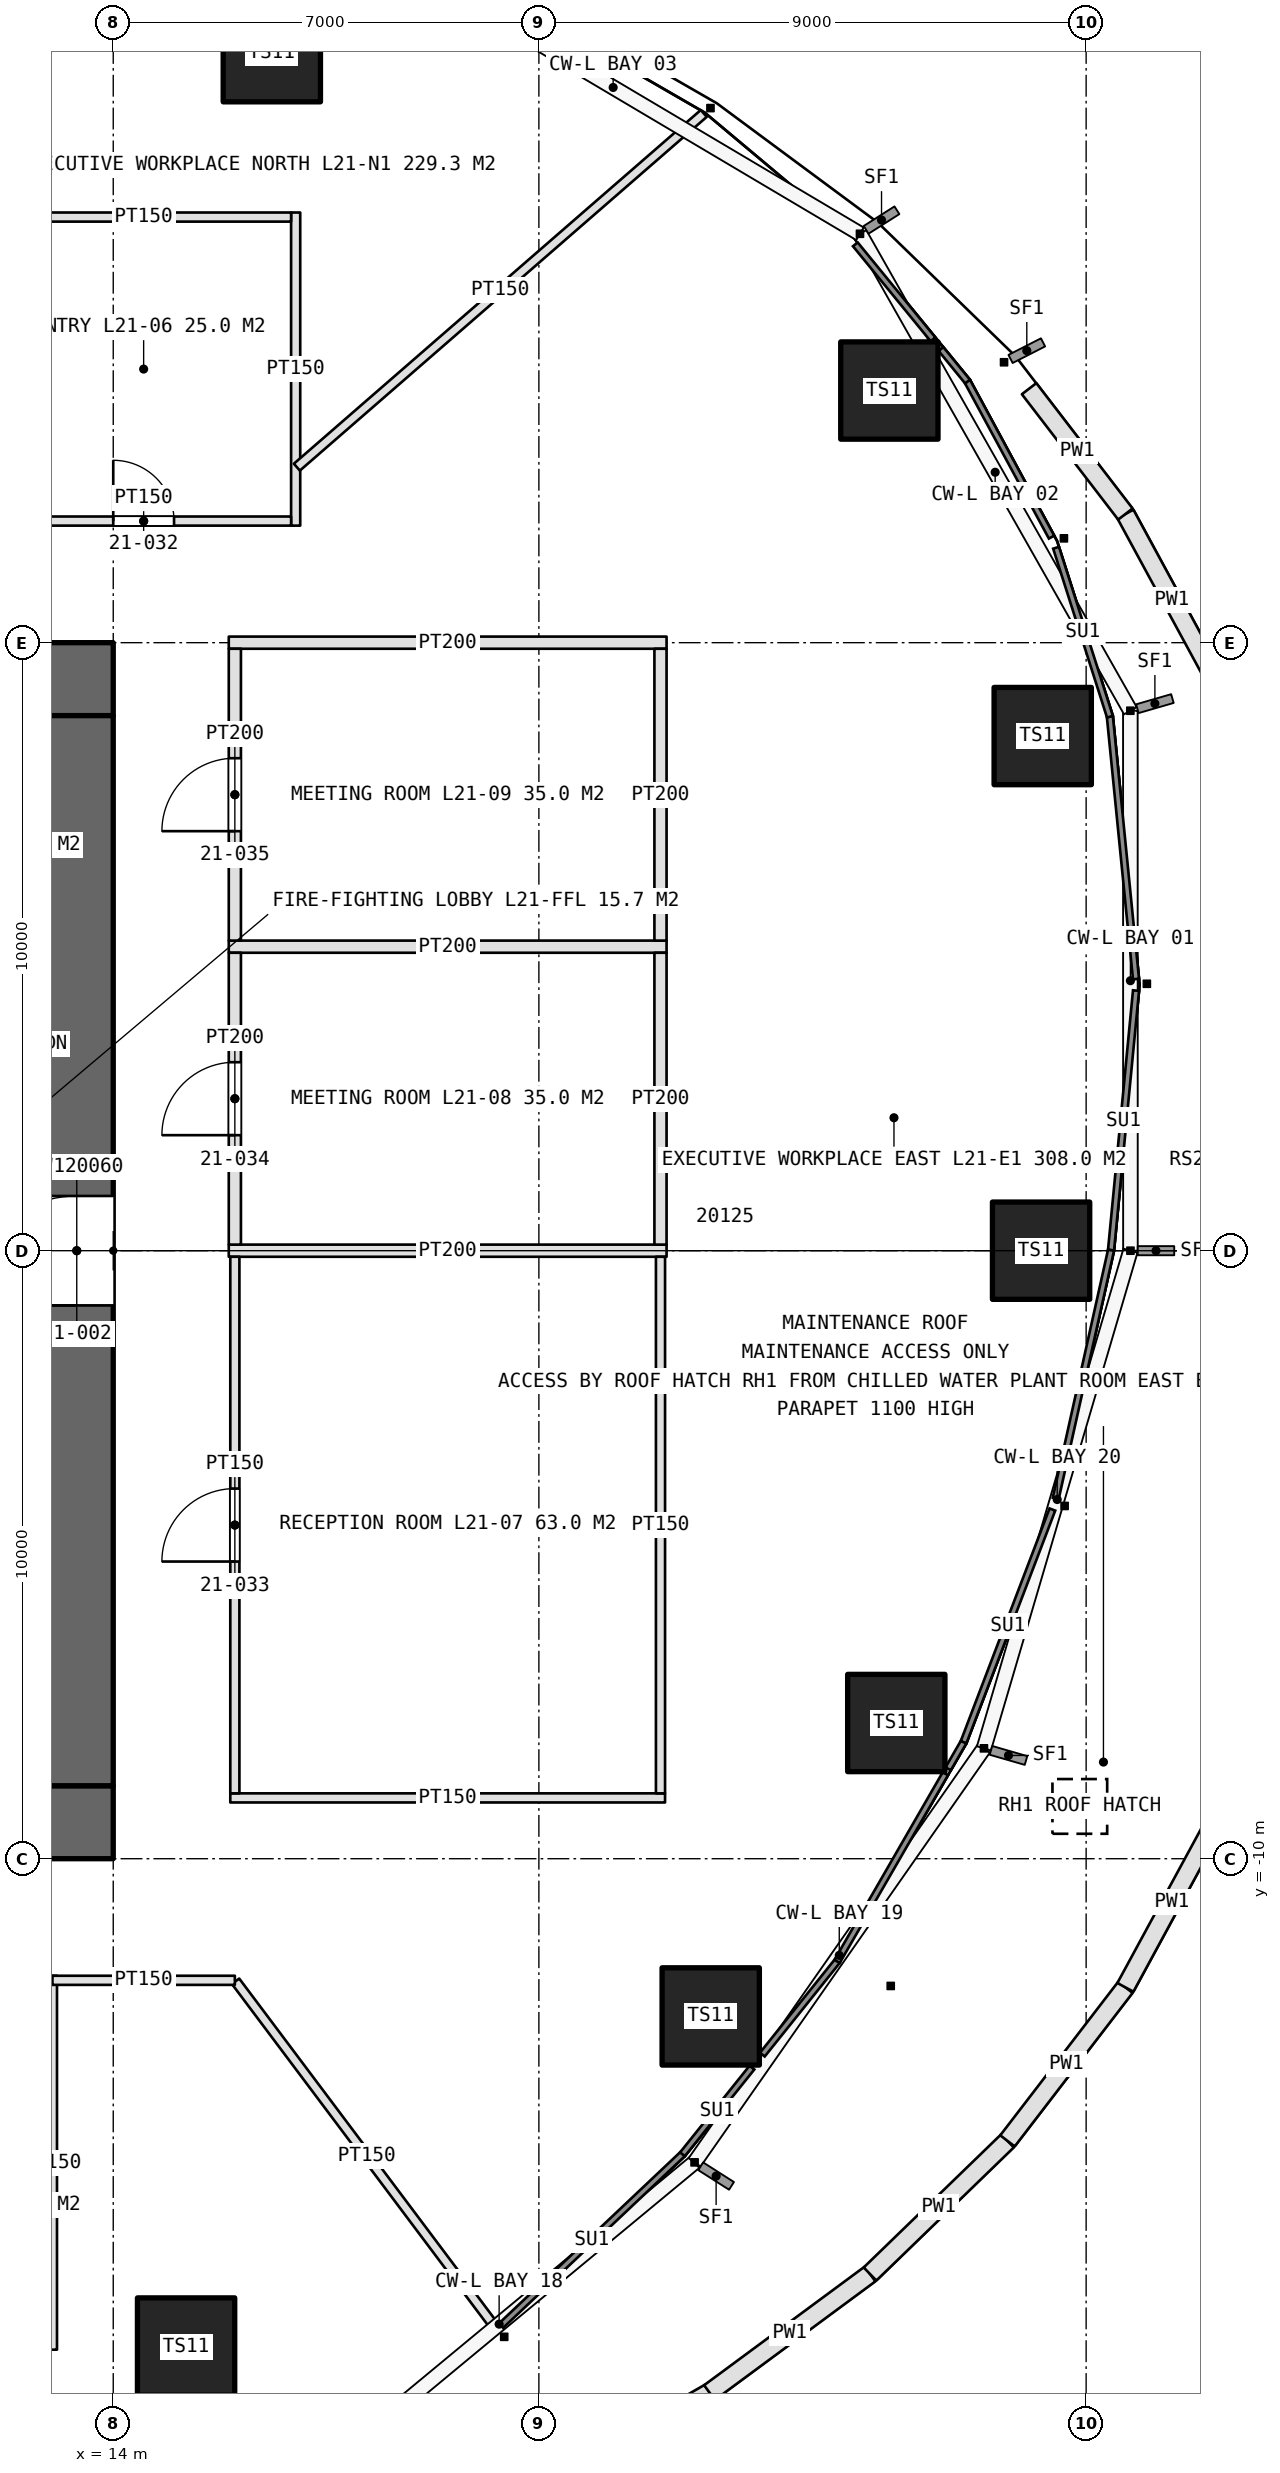
"""IFC4 building model, lengths in metres.
Left out: names, types, materials, properties, quantities, classifications, styles, units other than length and angle.
Written with IfcOpenShell. Run it as: python <this file> out.ifc"""

import sys

from ifc_helpers import new_model, si_unit, direction, frame, frame_2d, origin, origin_2d, place, context, subcontext, project, spatial, rectangle, hollow_rectangle, extrude, element, fill, save


model = new_model("IFC4")
c1 = context("Model", 3, precision=1e-05, world=origin(), true_north=direction((0.0, 1.0)))
c2 = subcontext(c1, "Body", "Model", "MODEL_VIEW")
j1 = project(units=[si_unit("LENGTHUNIT", "METRE"), si_unit("PLANEANGLEUNIT", "RADIAN")], contexts=[c1])
p1 = place(None, origin())
s1 = spatial("IfcSite", under=j1, at=p1, CompositionType="ELEMENT")
p2 = place(p1, origin())
s2 = spatial("IfcBuilding", under=s1, at=p2, CompositionType="ELEMENT")
p3 = place(p2, frame((0.0, 0.0, 105.0)))
s3 = spatial("IfcBuildingStorey", under=s2, at=p3, CompositionType="ELEMENT", Elevation=105.0)
p4 = place(p3, frame((-14.0, -9.4, 0.0), z_axis=(0.0, 0.0, 1.0), x_axis=(1.0, 0.0, 0.0)))
e1 = element("IfcWall", 1, at=p4, inside=s3, PredefinedType="SHEAR", context=c2, shape_type="SweptSolid", body=[
    extrude(rectangle(XDim=28.0, YDim=1.2, at=frame_2d((14.0, 0.0))), origin(), (0.0, 0.0, 1.0), 4.2),
])
p5 = place(p4, frame((13.1, 0.0, 0.0)))
e2 = element("IfcOpeningElement", 2, at=p5, cuts=e1, PredefinedType="OPENING", context=c2, shape_type="SweptSolid", body=[
    extrude(rectangle(XDim=1.8, YDim=2.4, at=frame_2d((0.9, 1.2))), frame((0.0, 0.61, 0.0), z_axis=(0.0, -1.0, 0.0), x_axis=(1.0, 0.0, 0.0)), (0.0, 0.0, 1.0), 1.22),
])
p6 = place(p4, frame((22.9, 0.0, 0.0)))
e3 = element("IfcOpeningElement", 3, at=p6, cuts=e1, PredefinedType="OPENING", context=c2, shape_type="SweptSolid", body=[
    extrude(rectangle(XDim=2.2, YDim=2.7, at=frame_2d((1.1, 1.35))), frame((0.0, 0.61, 0.0), z_axis=(0.0, -1.0, 0.0), x_axis=(1.0, 0.0, 0.0)), (0.0, 0.0, 1.0), 1.22),
])
p7 = place(p3, frame((14.0, 9.4, 0.0), z_axis=(0.0, 0.0, 1.0), x_axis=(-1.0, 0.0, 0.0)))
e4 = element("IfcWall", 4, at=p7, inside=s3, PredefinedType="SHEAR", context=c2, shape_type="SweptSolid", body=[
    extrude(rectangle(XDim=28.0, YDim=1.2, at=frame_2d((14.0, 0.0))), origin(), (0.0, 0.0, 1.0), 4.2),
])
p8 = place(p7, frame((24.0, 0.0, 0.0)))
e5 = element("IfcOpeningElement", 5, at=p8, cuts=e4, PredefinedType="OPENING", context=c2, shape_type="SweptSolid", body=[
    extrude(rectangle(XDim=1.0, YDim=2.4, at=frame_2d((0.5, 1.2))), frame((0.0, 0.61, 0.0), z_axis=(0.0, -1.0, 0.0), x_axis=(1.0, 0.0, 0.0)), (0.0, 0.0, 1.0), 1.22),
])
p9 = place(p7, frame((13.1, 0.0, 0.0)))
e6 = element("IfcOpeningElement", 6, at=p9, cuts=e4, PredefinedType="OPENING", context=c2, shape_type="SweptSolid", body=[
    extrude(rectangle(XDim=1.8, YDim=2.4, at=frame_2d((0.9, 1.2))), frame((0.0, 0.61, 0.0), z_axis=(0.0, -1.0, 0.0), x_axis=(1.0, 0.0, 0.0)), (0.0, 0.0, 1.0), 1.22),
])
p10 = place(p3, frame((13.4, -8.8, 0.0), z_axis=(0.0, 0.0, 1.0), x_axis=(0.0, 1.0, 0.0)))
e7 = element("IfcWall", 7, at=p10, inside=s3, PredefinedType="SHEAR", context=c2, shape_type="SweptSolid", body=[
    extrude(rectangle(XDim=17.6, YDim=1.2, at=frame_2d((8.8, 0.0))), origin(), (0.0, 0.0, 1.0), 4.2),
])
p11 = place(p10, frame((7.9, 0.0, 0.0)))
e8 = element("IfcOpeningElement", 8, at=p11, cuts=e7, PredefinedType="OPENING", context=c2, shape_type="SweptSolid", body=[
    extrude(rectangle(XDim=1.8, YDim=2.4, at=frame_2d((0.9, 1.2))), frame((0.0, 0.61, 0.0), z_axis=(0.0, -1.0, 0.0), x_axis=(1.0, 0.0, 0.0)), (0.0, 0.0, 1.0), 1.22),
])
for number, where, z_axis, x_axis in (
    (9, (29.259, 0.0, 0.975), (0.0, 0.0, 1.0), (1.0, 0.0, 0.0)),
    (10, (29.286, 8.464, 0.975), (0.0, 0.0, 1.0), (1.0, 0.0, 0.0)),
):
    element("IfcColumn", number, at=place(p3, frame(where, z_axis=z_axis, x_axis=x_axis)), inside=s3, PredefinedType="COLUMN", context=c2, shape_type="SweptSolid", body=[
        extrude(hollow_rectangle(XDim=1.6, YDim=1.6, WallThickness=0.15, at=origin_2d()), origin(), (0.0, 0.0, 1.0), 3.225),
    ])
for number, where, z_axis, x_axis in (
    (11, (26.764, 14.147, 0.0), (0.0, 0.0, 1.0), (1.0, 0.0, 0.0)),
    (12, (16.608, 19.695, 0.0), (0.0, 0.0, 1.0), (1.0, 0.0, 0.0)),
):
    element("IfcColumn", number, at=place(p3, frame(where, z_axis=z_axis, x_axis=x_axis)), inside=s3, PredefinedType="COLUMN", context=c2, shape_type="SweptSolid", body=[
        extrude(hollow_rectangle(XDim=1.6, YDim=1.6, WallThickness=0.15, at=origin_2d()), origin(), (0.0, 0.0, 1.0), 4.2),
    ])
for number, where, z_axis, x_axis in (
    (13, (15.198, -18.023, 0.975), (0.0, 0.0, 1.0), (1.0, 0.0, 0.0)),
    (14, (23.826, -12.594, 0.975), (0.0, 0.0, 1.0), (1.0, 0.0, 0.0)),
    (15, (26.878, -7.768, 0.975), (0.0, 0.0, 1.0), (1.0, 0.0, 0.0)),
):
    element("IfcColumn", number, at=place(p3, frame(where, z_axis=z_axis, x_axis=x_axis)), inside=s3, PredefinedType="COLUMN", context=c2, shape_type="SweptSolid", body=[
        extrude(hollow_rectangle(XDim=1.6, YDim=1.6, WallThickness=0.15, at=origin_2d()), origin(), (0.0, 0.0, 1.0), 3.225),
    ])
p12 = place(p3, frame((32.174, 9.299, 0.0), z_axis=(0.0, 0.0, 1.0), x_axis=(-0.476977537346, 0.878915484485, 0.0)))
e16 = element("IfcWall", 16, at=p12, inside=s3, PredefinedType="PARAPET", context=c2, shape_type="SweptSolid", body=[
    extrude(rectangle(XDim=3.205, YDim=0.3, at=frame_2d((1.602, 0.0))), origin(), (0.0, 0.0, 1.0), 1.1),
])
p13 = place(p3, frame((30.646, 12.116, 0.0), z_axis=(0.0, 0.0, 1.0), x_axis=(-0.60911150664, 0.79308459352, 0.0)))
e17 = element("IfcWall", 17, at=p13, inside=s3, PredefinedType="PARAPET", context=c2, shape_type="SweptSolid", body=[
    extrude(rectangle(XDim=2.6, YDim=0.3, at=frame_2d((1.3, 0.0))), origin(), (0.0, 0.0, 1.0), 1.1),
])
p14 = place(p3, frame((21.042, -20.365, 0.0), z_axis=(0.0, 0.0, 1.0), x_axis=(0.867530428681, 0.497384112444, 0.0)))
e18 = element("IfcWall", 18, at=p14, inside=s3, PredefinedType="PARAPET", context=c2, shape_type="SweptSolid", body=[
    extrude(rectangle(XDim=3.187, YDim=0.3, at=frame_2d((1.594, 0.0))), origin(), (0.0, 0.0, 1.0), 1.1),
])
p15 = place(p3, frame((23.806, -18.78, 0.0), z_axis=(0.0, 0.0, 1.0), x_axis=(0.804406464576, 0.594079321091, 0.0)))
e19 = element("IfcWall", 19, at=p15, inside=s3, PredefinedType="PARAPET", context=c2, shape_type="SweptSolid", body=[
    extrude(rectangle(XDim=3.281, YDim=0.3, at=frame_2d((1.641, 0.0))), origin(), (0.0, 0.0, 1.0), 1.1),
])
p16 = place(p3, frame((26.446, -16.831, 0.0), z_axis=(0.0, 0.0, 1.0), x_axis=(0.718226896914, 0.695808971306, 0.0)))
e20 = element("IfcWall", 20, at=p16, inside=s3, PredefinedType="PARAPET", context=c2, shape_type="SweptSolid", body=[
    extrude(rectangle(XDim=3.147, YDim=0.3, at=frame_2d((1.574, 0.0))), origin(), (0.0, 0.0, 1.0), 1.1),
])
p17 = place(p3, frame((28.707, -14.641, 0.0), z_axis=(0.0, 0.0, 1.0), x_axis=(0.609113922619, 0.793082737974, 0.0)))
e21 = element("IfcWall", 21, at=p17, inside=s3, PredefinedType="PARAPET", context=c2, shape_type="SweptSolid", body=[
    extrude(rectangle(XDim=3.184, YDim=0.3, at=frame_2d((1.592, 0.0))), origin(), (0.0, 0.0, 1.0), 1.1),
])
p18 = place(p3, frame((30.646, -12.116, 0.0), z_axis=(0.0, 0.0, 1.0), x_axis=(0.476977537346, 0.878915484485, 0.0)))
e22 = element("IfcWall", 22, at=p18, inside=s3, PredefinedType="PARAPET", context=c2, shape_type="SweptSolid", body=[
    extrude(rectangle(XDim=3.205, YDim=0.3, at=frame_2d((1.602, 0.0))), origin(), (0.0, 0.0, 1.0), 1.1),
])
p19 = place(p3, frame((17.0, 11.925, 0.0), z_axis=(0.0, 0.0, 1.0), x_axis=(0.0, 1.0, 0.0)))
e23 = element("IfcWall", 23, at=p19, inside=s3, PredefinedType="PARTITIONING", context=c2, shape_type="SweptSolid", body=[
    extrude(rectangle(XDim=5.15, YDim=0.15, at=frame_2d((2.575, 0.0))), origin(), (0.0, 0.0, 1.0), 3.0),
])
p20 = place(p3, frame((12.075, 12.0, 0.0), z_axis=(0.0, 0.0, 1.0), x_axis=(1.0, 0.0, 0.0)))
e24 = element("IfcWall", 24, at=p20, inside=s3, PredefinedType="PARTITIONING", context=c2, shape_type="SweptSolid", body=[
    extrude(rectangle(XDim=4.85, YDim=0.15, at=frame_2d((2.425, 0.0))), origin(), (0.0, 0.0, 1.0), 3.0),
])
p21 = place(p20, frame((1.925, 0.0, 0.0)))
e25 = element("IfcOpeningElement", 25, at=p21, cuts=e24, PredefinedType="OPENING", context=c2, shape_type="SweptSolid", body=[
    extrude(rectangle(XDim=1.0, YDim=2.2, at=frame_2d((0.5, 1.1))), frame((0.0, 0.085, 0.0), z_axis=(0.0, -1.0, 0.0), x_axis=(1.0, 0.0, 0.0)), (0.0, 0.0, 1.0), 0.17),
])
p22 = place(p3, frame((12.075, 17.0, 0.0), z_axis=(0.0, 0.0, 1.0), x_axis=(1.0, 0.0, 0.0)))
e26 = element("IfcWall", 26, at=p22, inside=s3, PredefinedType="PARTITIONING", context=c2, shape_type="SweptSolid", body=[
    extrude(rectangle(XDim=4.85, YDim=0.15, at=frame_2d((2.425, 0.0))), origin(), (0.0, 0.0, 1.0), 3.0),
])
p23 = place(p3, frame((15.925, -9.0, 0.0), z_axis=(0.0, 0.0, 1.0), x_axis=(1.0, 0.0, 0.0)))
e27 = element("IfcWall", 27, at=p23, inside=s3, PredefinedType="PARTITIONING", context=c2, shape_type="SweptSolid", body=[
    extrude(rectangle(XDim=7.15, YDim=0.15, at=frame_2d((3.575, 0.0))), origin(), (0.0, 0.0, 1.0), 3.0),
])
for number, where, z_axis, x_axis in (
    (28, (15.9, 0.0, 0.0), (0.0, 0.0, 1.0), (1.0, 0.0, 0.0)),
    (29, (15.9, 5.0, 0.0), (0.0, 0.0, 1.0), (1.0, 0.0, 0.0)),
    (30, (15.9, 10.0, 0.0), (0.0, 0.0, 1.0), (1.0, 0.0, 0.0)),
):
    element("IfcWall", number, at=place(p3, frame(where, z_axis=z_axis, x_axis=x_axis)), inside=s3, PredefinedType="PARTITIONING", context=c2, shape_type="SweptSolid", body=[
        extrude(rectangle(XDim=7.2, YDim=0.2, at=frame_2d((3.6, 0.0))), origin(), (0.0, 0.0, 1.0), 3.0),
    ])
p24 = place(p3, frame((16.0, -8.925, 0.0), z_axis=(0.0, 0.0, 1.0), x_axis=(0.0, 1.0, 0.0)))
e31 = element("IfcWall", 31, at=p24, inside=s3, PredefinedType="PARTITIONING", context=c2, shape_type="SweptSolid", body=[
    extrude(rectangle(XDim=8.825, YDim=0.15, at=frame_2d((4.413, 0.0))), origin(), (0.0, 0.0, 1.0), 3.0),
])
p25 = place(p24, frame((3.812, 0.0, 0.0)))
e32 = element("IfcOpeningElement", 32, at=p25, cuts=e31, PredefinedType="OPENING", context=c2, shape_type="SweptSolid", body=[
    extrude(rectangle(XDim=1.2, YDim=2.4, at=frame_2d((0.6, 1.2))), frame((0.0, 0.085, 0.0), z_axis=(0.0, -1.0, 0.0), x_axis=(1.0, 0.0, 0.0)), (0.0, 0.0, 1.0), 0.17),
])
p26 = place(p3, frame((23.0, -8.925, 0.0), z_axis=(0.0, 0.0, 1.0), x_axis=(0.0, 1.0, 0.0)))
e33 = element("IfcWall", 33, at=p26, inside=s3, PredefinedType="PARTITIONING", context=c2, shape_type="SweptSolid", body=[
    extrude(rectangle(XDim=8.825, YDim=0.15, at=frame_2d((4.413, 0.0))), origin(), (0.0, 0.0, 1.0), 3.0),
])
p27 = place(p3, frame((16.0, 0.1, 0.0), z_axis=(0.0, 0.0, 1.0), x_axis=(0.0, 1.0, 0.0)))
e34 = element("IfcWall", 34, at=p27, inside=s3, PredefinedType="PARTITIONING", context=c2, shape_type="SweptSolid", body=[
    extrude(rectangle(XDim=4.8, YDim=0.2, at=frame_2d((2.4, 0.0))), origin(), (0.0, 0.0, 1.0), 3.0),
])
p28 = place(p27, frame((1.8, 0.0, 0.0)))
e35 = element("IfcOpeningElement", 35, at=p28, cuts=e34, PredefinedType="OPENING", context=c2, shape_type="SweptSolid", body=[
    extrude(rectangle(XDim=1.2, YDim=2.4, at=frame_2d((0.6, 1.2))), frame((0.0, 0.11, 0.0), z_axis=(0.0, -1.0, 0.0), x_axis=(1.0, 0.0, 0.0)), (0.0, 0.0, 1.0), 0.22),
])
p29 = place(p3, frame((23.0, 0.1, 0.0), z_axis=(0.0, 0.0, 1.0), x_axis=(0.0, 1.0, 0.0)))
e36 = element("IfcWall", 36, at=p29, inside=s3, PredefinedType="PARTITIONING", context=c2, shape_type="SweptSolid", body=[
    extrude(rectangle(XDim=4.8, YDim=0.2, at=frame_2d((2.4, 0.0))), origin(), (0.0, 0.0, 1.0), 3.0),
])
p30 = place(p3, frame((16.0, 5.1, 0.0), z_axis=(0.0, 0.0, 1.0), x_axis=(0.0, 1.0, 0.0)))
e37 = element("IfcWall", 37, at=p30, inside=s3, PredefinedType="PARTITIONING", context=c2, shape_type="SweptSolid", body=[
    extrude(rectangle(XDim=4.8, YDim=0.2, at=frame_2d((2.4, 0.0))), origin(), (0.0, 0.0, 1.0), 3.0),
])
p31 = place(p30, frame((1.8, 0.0, 0.0)))
e38 = element("IfcOpeningElement", 38, at=p31, cuts=e37, PredefinedType="OPENING", context=c2, shape_type="SweptSolid", body=[
    extrude(rectangle(XDim=1.2, YDim=2.4, at=frame_2d((0.6, 1.2))), frame((0.0, 0.11, 0.0), z_axis=(0.0, -1.0, 0.0), x_axis=(1.0, 0.0, 0.0)), (0.0, 0.0, 1.0), 0.22),
])
p32 = place(p3, frame((23.0, 5.1, 0.0), z_axis=(0.0, 0.0, 1.0), x_axis=(0.0, 1.0, 0.0)))
e39 = element("IfcWall", 39, at=p32, inside=s3, PredefinedType="PARTITIONING", context=c2, shape_type="SweptSolid", body=[
    extrude(rectangle(XDim=4.8, YDim=0.2, at=frame_2d((2.4, 0.0))), origin(), (0.0, 0.0, 1.0), 3.0),
])
p33 = place(p3, frame((13.0, -11.925, 0.0), z_axis=(0.0, 0.0, 1.0), x_axis=(0.0, -1.0, 0.0)))
e40 = element("IfcWall", 40, at=p33, inside=s3, PredefinedType="PARTITIONING", context=c2, shape_type="SweptSolid", body=[
    extrude(rectangle(XDim=6.15, YDim=0.15, at=frame_2d((3.075, 0.0))), origin(), (0.0, 0.0, 1.0), 3.0),
])
p34 = place(p3, frame((16.012, -12.016, 0.0), z_axis=(0.0, 0.0, 1.0), x_axis=(0.600059749679, -0.799955184254, 0.0)))
e41 = element("IfcWall", 41, at=p34, inside=s3, PredefinedType="PARTITIONING", context=c2, shape_type="SweptSolid", body=[
    extrude(rectangle(XDim=7.191, YDim=0.15, at=frame_2d((3.596, 0.0))), origin(), (0.0, 0.0, 1.0), 3.0),
])
p35 = place(p3, frame((17.02, 12.887, 0.0), z_axis=(0.0, 0.0, 1.0), x_axis=(0.75468613342, 0.656086000479, 0.0)))
e42 = element("IfcWall", 42, at=p35, inside=s3, PredefinedType="PARTITIONING", context=c2, shape_type="SweptSolid", body=[
    extrude(rectangle(XDim=8.867, YDim=0.15, at=frame_2d((4.433, 0.0))), origin(), (0.0, 0.0, 1.0), 3.0),
])
p36 = place(p3, frame((13.0, -12.0, 0.0), z_axis=(0.0, 0.0, 1.0), x_axis=(1.0, 0.0, 0.0)))
e43 = element("IfcWall", 43, at=p36, inside=s3, PredefinedType="PARTITIONING", context=c2, shape_type="SweptSolid", body=[
    extrude(rectangle(XDim=3.0, YDim=0.15, at=frame_2d((1.5, 0.0))), origin(), (0.0, 0.0, 1.0), 3.0),
])
p37 = place(p3, frame((0.0, 0.0, -0.275)))
p38 = place(p37, frame((29.896, -9.14, 0.0)))
p39 = place(p38, frame((0.0, 0.0, 0.225)))
e44 = element("IfcWindow", 44, at=p39, inside=s3, PartitioningType="SINGLE_PANEL", PredefinedType="SKYLIGHT", context=c2, shape_type="SweptSolid", body=[
    extrude(rectangle(XDim=0.9, YDim=0.9, at=origin_2d()), origin(), (0.0, 0.0, 1.0), 0.05),
])
p40 = place(p11, origin())
e45 = element("IfcDoor", 45, at=p40, inside=s3, OperationType="DOUBLE_DOOR_SINGLE_SWING", PredefinedType="DOOR", context=c2, shape_type="SweptSolid", body=[
    extrude(rectangle(XDim=1.8, YDim=2.4, at=frame_2d((0.9, 1.2))), frame((0.0, 0.025, 0.0), z_axis=(0.0, -1.0, 0.0), x_axis=(1.0, 0.0, 0.0)), (0.0, 0.0, 1.0), 0.05),
])
fill(e8, e45)
p41 = place(p21, origin())
e46 = element("IfcDoor", 46, at=p41, inside=s3, OperationType="SINGLE_SWING_LEFT", PredefinedType="DOOR", context=c2, shape_type="SweptSolid", body=[
    extrude(rectangle(XDim=1.0, YDim=2.2, at=frame_2d((0.5, 1.1))), frame((0.0, 0.025, 0.0), z_axis=(0.0, -1.0, 0.0), x_axis=(1.0, 0.0, 0.0)), (0.0, 0.0, 1.0), 0.05),
])
fill(e25, e46)
p42 = place(p25, origin())
e47 = element("IfcDoor", 47, at=p42, inside=s3, OperationType="SINGLE_SWING_LEFT", PredefinedType="DOOR", context=c2, shape_type="SweptSolid", body=[
    extrude(rectangle(XDim=1.2, YDim=2.4, at=frame_2d((0.6, 1.2))), frame((0.0, 0.025, 0.0), z_axis=(0.0, -1.0, 0.0), x_axis=(1.0, 0.0, 0.0)), (0.0, 0.0, 1.0), 0.05),
])
fill(e32, e47)
p43 = place(p28, origin())
e48 = element("IfcDoor", 48, at=p43, inside=s3, OperationType="SINGLE_SWING_LEFT", PredefinedType="DOOR", context=c2, shape_type="SweptSolid", body=[
    extrude(rectangle(XDim=1.2, YDim=2.4, at=frame_2d((0.6, 1.2))), frame((0.0, 0.025, 0.0), z_axis=(0.0, -1.0, 0.0), x_axis=(1.0, 0.0, 0.0)), (0.0, 0.0, 1.0), 0.05),
])
fill(e35, e48)
p44 = place(p31, origin())
e49 = element("IfcDoor", 49, at=p44, inside=s3, OperationType="SINGLE_SWING_LEFT", PredefinedType="DOOR", context=c2, shape_type="SweptSolid", body=[
    extrude(rectangle(XDim=1.2, YDim=2.4, at=frame_2d((0.6, 1.2))), frame((0.0, 0.025, 0.0), z_axis=(0.0, -1.0, 0.0), x_axis=(1.0, 0.0, 0.0)), (0.0, 0.0, 1.0), 0.05),
])
fill(e38, e49)
save(model, sys.argv[1])
